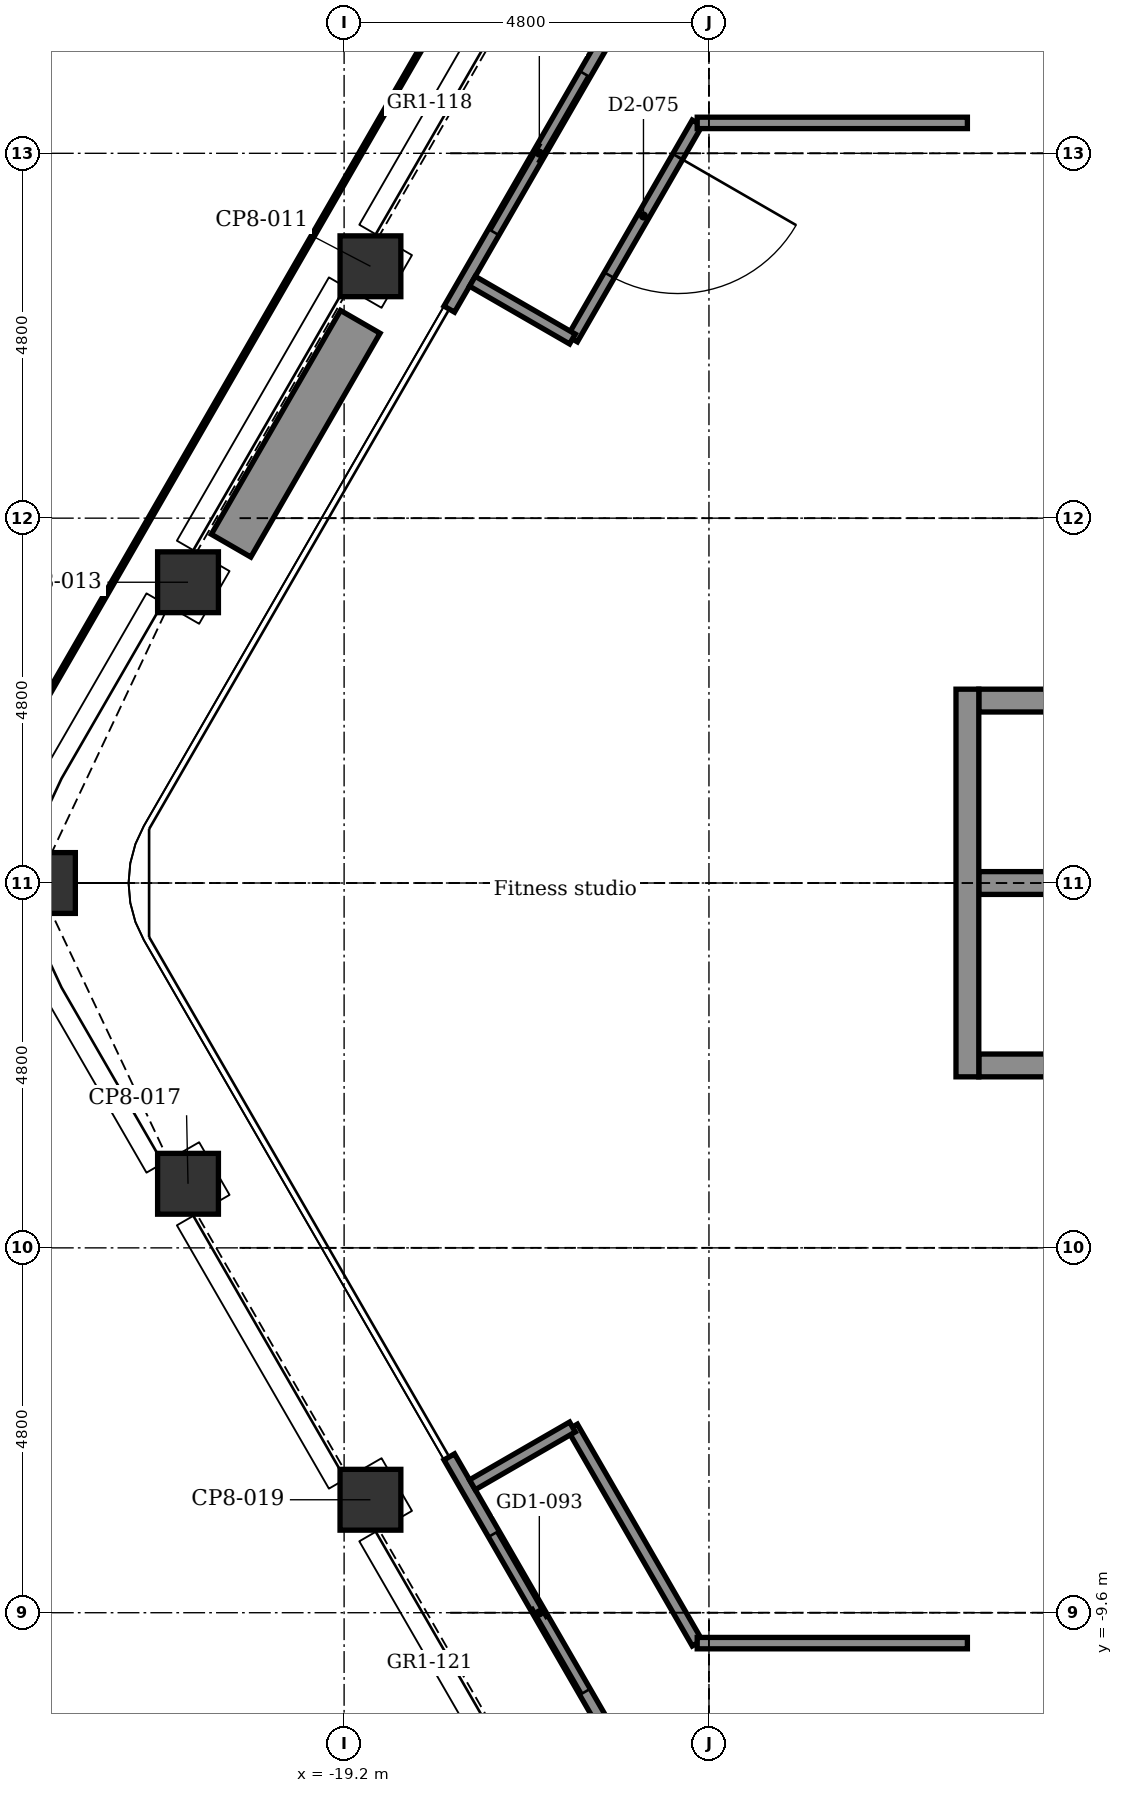
"""IFC4 building model, lengths in metres.
Left out: names, types, materials, properties, quantities, classifications, styles, units other than length and angle.
Written with IfcOpenShell. Run it as: python <this file> out.ifc"""

import sys

from ifc_helpers import new_model, si_unit, direction, frame, frame_2d, origin, origin_2d, place, context, subcontext, project, spatial, rectangle, extrude, element, fill, save


model = new_model("IFC4")
c1 = context("Model", 3, precision=1e-05, world=origin(), true_north=direction((0.0, 1.0)))
c2 = subcontext(c1, "Body", "Model", "MODEL_VIEW")
j1 = project(units=[si_unit("LENGTHUNIT", "METRE"), si_unit("PLANEANGLEUNIT", "RADIAN")], contexts=[c1])
p1 = place(None, origin())
s1 = spatial("IfcSite", under=j1, at=p1, CompositionType="ELEMENT")
p2 = place(p1, origin())
s2 = spatial("IfcBuilding", under=s1, at=p2, CompositionType="ELEMENT")
p3 = place(p2, frame((0.0, 0.0, 269.6)))
s3 = spatial("IfcBuildingStorey", under=s2, at=p3, CompositionType="ELEMENT", Elevation=269.6)
for number, where, z_axis, x_axis in (
    (1, (-18.854, -8.114, -0.15), (0.0, 0.0, 1.0), (0.866, 0.5, 0.0)),
    (2, (-21.254, -3.957, -0.15), (0.0, 0.0, 1.0), (0.866, 0.5, 0.0)),
    (3, (-23.136, 0.0, -0.15), (0.0, 0.0, 1.0), (1.0, 0.0, 0.0)),
    (4, (-21.254, 3.957, -0.15), (0.0, 0.0, 1.0), (0.5, 0.866, 0.0)),
    (5, (-18.854, 8.114, -0.15), (0.0, 0.0, 1.0), (0.5, 0.866, 0.0)),
):
    element("IfcColumn", number, at=place(p3, frame(where, z_axis=z_axis, x_axis=x_axis)), inside=s3, PredefinedType="COLUMN", context=c2, shape_type="SweptSolid", body=[
        extrude(rectangle(XDim=0.8, YDim=0.8, at=origin_2d()), origin(), (0.0, 0.0, 1.0), 3.9),
    ])
p4 = place(p3, frame((-10.85, -2.4, -0.15), z_axis=(0.0, 0.0, 1.0), x_axis=(1.0, 0.0, 0.0)))
e6 = element("IfcWall", 6, at=p4, inside=s3, PredefinedType="STANDARD", context=c2, shape_type="SweptSolid", body=[
    extrude(rectangle(XDim=1.1, YDim=0.3, at=frame_2d((0.55, 0.0))), origin(), (0.0, 0.0, 1.0), 3.9),
])
p5 = place(p3, frame((-10.85, 0.0, -0.15), z_axis=(0.0, 0.0, 1.0), x_axis=(1.0, 0.0, 0.0)))
e7 = element("IfcWall", 7, at=p5, inside=s3, PredefinedType="STANDARD", context=c2, shape_type="SweptSolid", body=[
    extrude(rectangle(XDim=3.3, YDim=0.3, at=frame_2d((1.65, 0.0))), origin(), (0.0, 0.0, 1.0), 3.9),
])
p6 = place(p3, frame((-10.85, 2.4, -0.15), z_axis=(0.0, 0.0, 1.0), x_axis=(1.0, 0.0, 0.0)))
e8 = element("IfcWall", 8, at=p6, inside=s3, PredefinedType="STANDARD", context=c2, shape_type="SweptSolid", body=[
    extrude(rectangle(XDim=1.1, YDim=0.3, at=frame_2d((0.55, 0.0))), origin(), (0.0, 0.0, 1.0), 3.9),
])
p7 = place(p3, frame((-11.0, -2.55, -0.15), z_axis=(0.0, 0.0, 1.0), x_axis=(0.0, 1.0, 0.0)))
e9 = element("IfcWall", 9, at=p7, inside=s3, PredefinedType="STANDARD", context=c2, shape_type="SweptSolid", body=[
    extrude(rectangle(XDim=5.1, YDim=0.3, at=frame_2d((2.55, 0.0))), origin(), (0.0, 0.0, 1.0), 3.9),
])
p8 = place(p3, frame((-15.447, -11.655, 0.0), z_axis=(0.0, 0.0, 1.0), x_axis=(-0.499978080042, 0.866038058908, 0.0)))
e10 = element("IfcWall", 10, at=p8, inside=s3, PredefinedType="PARTITIONING", context=c2, shape_type="SweptSolid", body=[
    extrude(rectangle(XDim=4.74, YDim=0.16, at=frame_2d((2.37, 0.0))), origin(), (0.0, 0.0, 1.0), 3.75),
])
p9 = place(p8, frame((1.17, 0.0, 0.0)))
e11 = element("IfcOpeningElement", 11, at=p9, cuts=e10, PredefinedType="OPENING", context=c2, shape_type="SweptSolid", body=[
    extrude(rectangle(XDim=2.4, YDim=2.4, at=frame_2d((1.2, 1.2))), frame((0.0, 0.09, 0.0), z_axis=(0.0, -1.0, 0.0), x_axis=(1.0, 0.0, 0.0)), (0.0, 0.0, 1.0), 0.18),
])
p10 = place(p3, frame((-17.817, 7.55, 0.0), z_axis=(0.0, 0.0, 1.0), x_axis=(0.499978080042, 0.866038058908, 0.0)))
e12 = element("IfcWall", 12, at=p10, inside=s3, PredefinedType="PARTITIONING", context=c2, shape_type="SweptSolid", body=[
    extrude(rectangle(XDim=4.74, YDim=0.16, at=frame_2d((2.37, 0.0))), origin(), (0.0, 0.0, 1.0), 3.75),
])
p11 = place(p10, frame((1.17, 0.0, 0.0)))
e13 = element("IfcOpeningElement", 13, at=p11, cuts=e12, PredefinedType="OPENING", context=c2, shape_type="SweptSolid", body=[
    extrude(rectangle(XDim=2.4, YDim=2.4, at=frame_2d((1.2, 1.2))), frame((0.0, 0.09, 0.0), z_axis=(0.0, -1.0, 0.0), x_axis=(1.0, 0.0, 0.0)), (0.0, 0.0, 1.0), 0.18),
])
p12 = place(p3, frame((-20.687, 4.438, 0.0), z_axis=(0.0, 0.0, 1.0), x_axis=(0.500008388397, 0.866020560687, 0.0)))
e14 = element("IfcWall", 14, at=p12, inside=s3, PredefinedType="USERDEFINED", context=c2, shape_type="SweptSolid", body=[
    extrude(rectangle(XDim=3.4, YDim=0.6, at=frame_2d((1.7, 0.0))), origin(), (0.0, 0.0, 1.0), 0.7),
])
p13 = place(p3, frame((-16.196, -7.157, 0.0), z_axis=(0.0, 0.0, 1.0), x_axis=(0.499954196102, -0.866051847062, 0.0)))
e15 = element("IfcWall", 15, at=p13, inside=s3, PredefinedType="PARTITIONING", context=c2, shape_type="SweptSolid", body=[
    extrude(rectangle(XDim=3.283, YDim=0.15, at=frame_2d((1.642, 0.0))), origin(), (0.0, 0.0, 1.0), 3.75),
])
p14 = place(p3, frame((-16.196, 7.157, 0.0), z_axis=(0.0, 0.0, 1.0), x_axis=(0.499954196102, 0.866051847062, 0.0)))
e16 = element("IfcWall", 16, at=p14, inside=s3, PredefinedType="PARTITIONING", context=c2, shape_type="SweptSolid", body=[
    extrude(rectangle(XDim=3.283, YDim=0.15, at=frame_2d((1.642, 0.0))), origin(), (0.0, 0.0, 1.0), 3.75),
])
p15 = place(p14, frame((0.969, 0.0, 0.0)))
e17 = element("IfcOpeningElement", 17, at=p15, cuts=e16, PredefinedType="OPENING", context=c2, shape_type="SweptSolid", body=[
    extrude(rectangle(XDim=1.8, YDim=2.1, at=frame_2d((0.9, 1.05))), frame((0.0, 0.085, 0.0), z_axis=(0.0, -1.0, 0.0), x_axis=(1.0, 0.0, 0.0)), (0.0, 0.0, 1.0), 0.17),
])
for number, where, z_axis, x_axis in (
    (18, (-17.512, 7.917, 0.0), (0.0, 0.0, 1.0), (0.866, -0.5, 0.0)),
    (19, (-17.512, -7.917, 0.0), (0.0, 0.0, 1.0), (0.866, 0.5, 0.0)),
):
    element("IfcWall", number, at=place(p3, frame(where, z_axis=z_axis, x_axis=x_axis)), inside=s3, PredefinedType="PARTITIONING", context=c2, shape_type="SweptSolid", body=[
        extrude(rectangle(XDim=1.52, YDim=0.15, at=frame_2d((0.76, 0.0))), origin(), (0.0, 0.0, 1.0), 3.75),
    ])
for number, where, z_axis, x_axis in (
    (20, (-14.555, -10.0, 0.0), (0.0, 0.0, 1.0), (1.0, 0.0, 0.0)),
    (21, (-14.555, 10.0, 0.0), (0.0, 0.0, 1.0), (1.0, 0.0, 0.0)),
):
    element("IfcWall", number, at=place(p3, frame(where, z_axis=z_axis, x_axis=x_axis)), inside=s3, PredefinedType="PARTITIONING", context=c2, shape_type="SweptSolid", body=[
        extrude(rectangle(XDim=3.555, YDim=0.15, at=frame_2d((1.777, 0.0))), origin(), (0.0, 0.0, 1.0), 3.75),
    ])
p16 = place(p9, origin())
e22 = element("IfcDoor", 22, at=p16, inside=s3, OperationType="DOUBLE_DOOR_SLIDING", PredefinedType="DOOR", context=c2, shape_type="SweptSolid", body=[
    extrude(rectangle(XDim=2.4, YDim=2.4, at=frame_2d((1.2, 1.2))), frame((0.0, 0.025, 0.0), z_axis=(0.0, -1.0, 0.0), x_axis=(1.0, 0.0, 0.0)), (0.0, 0.0, 1.0), 0.05),
])
fill(e11, e22)
p17 = place(p11, origin())
e23 = element("IfcDoor", 23, at=p17, inside=s3, OperationType="DOUBLE_DOOR_SLIDING", PredefinedType="DOOR", context=c2, shape_type="SweptSolid", body=[
    extrude(rectangle(XDim=2.4, YDim=2.4, at=frame_2d((1.2, 1.2))), frame((0.0, 0.025, 0.0), z_axis=(0.0, -1.0, 0.0), x_axis=(1.0, 0.0, 0.0)), (0.0, 0.0, 1.0), 0.05),
])
fill(e13, e23)
p18 = place(p15, frame((1.8, 0.0, 0.0), z_axis=(0.0, 0.0, 1.0), x_axis=(-1.0, 0.0, 0.0)))
e24 = element("IfcDoor", 24, at=p18, inside=s3, OperationType="SINGLE_SWING_RIGHT", PredefinedType="DOOR", context=c2, shape_type="SweptSolid", body=[
    extrude(rectangle(XDim=1.8, YDim=2.1, at=frame_2d((0.9, 1.05))), frame((0.0, 0.025, 0.0), z_axis=(0.0, -1.0, 0.0), x_axis=(1.0, 0.0, 0.0)), (0.0, 0.0, 1.0), 0.05),
])
fill(e17, e24)
save(model, sys.argv[1])
